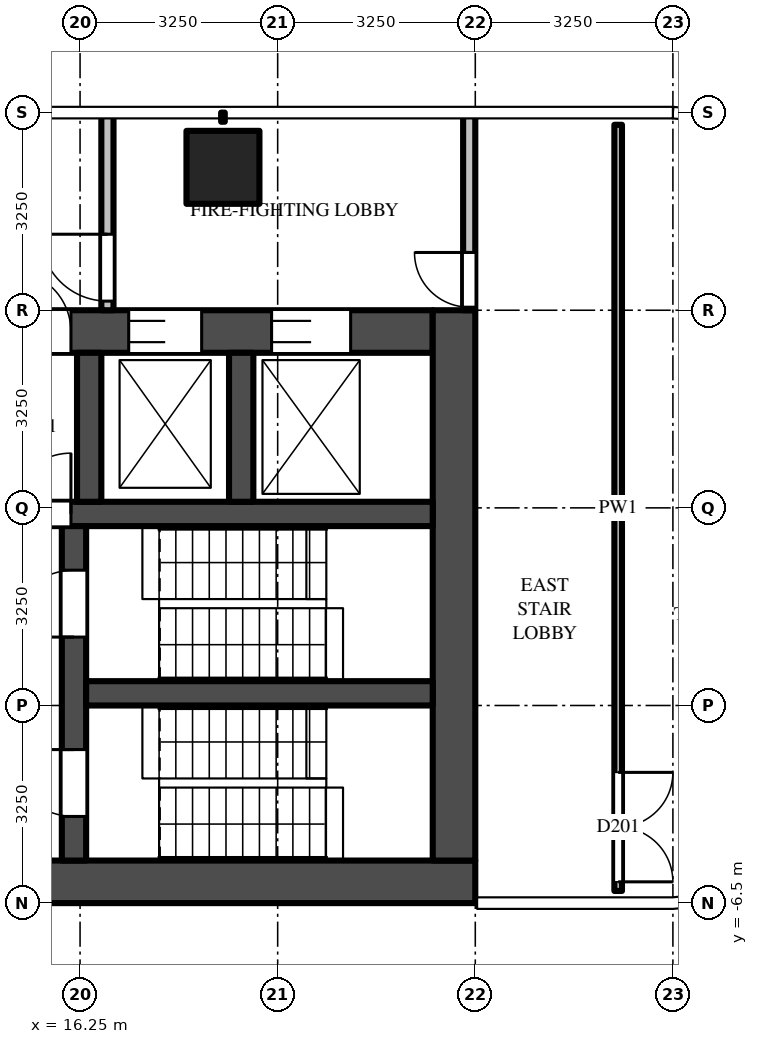
"""IFC4 building model, lengths in metres.
Left out: names, types, materials, properties, quantities, classifications, styles, units other than length and angle.
Written with IfcOpenShell. Run it as: python <this file> out.ifc"""

import sys

from ifc_helpers import new_model, si_unit, direction, frame, frame_2d, origin, origin_2d, place, context, subcontext, project, spatial, rectangle, extrude, source, transform, mapped, element, fill, save


model = new_model("IFC4")
c1 = context("Model", 3, precision=1e-05, world=origin(), true_north=direction((0.0, 1.0)))
c2 = subcontext(c1, "Body", "Model", "MODEL_VIEW")
j1 = project(units=[si_unit("LENGTHUNIT", "METRE"), si_unit("PLANEANGLEUNIT", "RADIAN")], contexts=[c1])
p1 = place(None, origin())
s1 = spatial("IfcSite", under=j1, at=p1, CompositionType="ELEMENT")
p2 = place(p1, origin())
s2 = spatial("IfcBuilding", under=s1, at=p2, CompositionType="ELEMENT")
p3 = place(p2, frame((0.0, 0.0, 204.9)))
s3 = spatial("IfcBuildingStorey", under=s2, at=p3, CompositionType="ELEMENT", Elevation=204.9)
m1 = source(origin(), c2, "Body", "SweptSolid", [
    extrude(rectangle(XDim=1.2, YDim=1.2, at=origin_2d()), origin(), (0.0, 0.0, 1.0), 3.9),
])
p4 = place(p3, frame((18.6, 5.6, 0.0), z_axis=(0.0, 0.0, 1.0), x_axis=(1.0, 0.0, 0.0)))
e1 = element("IfcColumn", 1, at=p4, inside=s3, PredefinedType="COLUMN", context=c2, shape_type="MappedRepresentation", body=[
    mapped(m1, transform((0.0, 0.0, 0.0))),
])
m2 = source(origin(), c2, "Body", "SweptSolid", [
    extrude(rectangle(XDim=16.55, YDim=0.7, at=frame_2d((8.275, 0.0))), origin(), (0.0, 0.0, 1.0), 3.7),
])
p5 = place(p3, frame((6.2, -6.15, 0.0), z_axis=(0.0, 0.0, 1.0), x_axis=(1.0, 0.0, 0.0)))
e2 = element("IfcWall", 2, at=p5, inside=s3, PredefinedType="SHEAR", context=c2, shape_type="MappedRepresentation", body=[
    mapped(m2, transform((0.0, 0.0, 0.0))),
])
m3 = source(origin(), c2, "Body", "SweptSolid", [
    extrude(rectangle(XDim=14.85, YDim=0.7, at=frame_2d((7.425, 0.0))), origin(), (0.0, 0.0, 1.0), 3.7),
])
p6 = place(p3, frame((7.2, 2.9, 0.0), z_axis=(0.0, 0.0, 1.0), x_axis=(1.0, 0.0, 0.0)))
e3 = element("IfcWall", 3, at=p6, inside=s3, PredefinedType="SHEAR", context=c2, shape_type="MappedRepresentation", body=[
    mapped(m3, transform((0.0, 0.0, 0.0))),
])
m4 = source(origin(), c2, "Body", "SweptSolid", [
    extrude(rectangle(XDim=1.1, YDim=2.1, at=frame_2d((0.55, 1.05))), frame((0.0, 0.36, 0.0), z_axis=(0.0, -1.0, 0.0), x_axis=(1.0, 0.0, 0.0)), (0.0, 0.0, 1.0), 0.72),
])
p7 = place(p6, frame((0.55, 0.0, 0.0)))
e4 = element("IfcOpeningElement", 4, at=p7, cuts=e3, PredefinedType="OPENING", context=c2, shape_type="MappedRepresentation", body=[
    mapped(m4, transform((0.0, 0.0, 0.0))),
])
p8 = place(p6, frame((3.15, 0.0, 0.0)))
e5 = element("IfcOpeningElement", 5, at=p8, cuts=e3, PredefinedType="OPENING", context=c2, shape_type="MappedRepresentation", body=[
    mapped(m4, transform((0.0, 0.0, 0.0))),
])
m5 = source(origin(), c2, "Body", "SweptSolid", [
    extrude(rectangle(XDim=1.2, YDim=2.1, at=frame_2d((0.6, 1.05))), frame((0.0, 0.36, 0.0), z_axis=(0.0, -1.0, 0.0), x_axis=(1.0, 0.0, 0.0)), (0.0, 0.0, 1.0), 0.72),
])
p9 = place(p6, frame((5.7, 0.0, 0.0)))
e6 = element("IfcOpeningElement", 6, at=p9, cuts=e3, PredefinedType="OPENING", context=c2, shape_type="MappedRepresentation", body=[
    mapped(m5, transform((0.0, 0.0, 0.0))),
])
m6 = source(origin(), c2, "Body", "SweptSolid", [
    extrude(rectangle(XDim=1.3, YDim=2.1, at=frame_2d((0.65, 1.05))), frame((0.0, 0.36, 0.0), z_axis=(0.0, -1.0, 0.0), x_axis=(1.0, 0.0, 0.0)), (0.0, 0.0, 1.0), 0.72),
])
p10 = place(p6, frame((12.2, 0.0, 0.0)))
e7 = element("IfcOpeningElement", 7, at=p10, cuts=e3, PredefinedType="OPENING", context=c2, shape_type="MappedRepresentation", body=[
    mapped(m6, transform((0.0, 0.0, 0.0))),
])
p11 = place(p6, frame((9.85, 0.0, 0.0)))
e8 = element("IfcOpeningElement", 8, at=p11, cuts=e3, PredefinedType="OPENING", context=c2, shape_type="MappedRepresentation", body=[
    mapped(m5, transform((0.0, 0.0, 0.0))),
])
m7 = source(origin(), c2, "Body", "SweptSolid", [
    extrude(rectangle(XDim=1.0, YDim=2.1, at=frame_2d((0.5, 1.05))), frame((0.0, 0.36, 0.0), z_axis=(0.0, -1.0, 0.0), x_axis=(1.0, 0.0, 0.0)), (0.0, 0.0, 1.0), 0.72),
])
p12 = place(p6, frame((7.9, 0.0, 0.0)))
e9 = element("IfcOpeningElement", 9, at=p12, cuts=e3, PredefinedType="OPENING", context=c2, shape_type="MappedRepresentation", body=[
    mapped(m7, transform((0.0, 0.0, 0.0))),
])
m8 = source(origin(), c2, "Body", "SweptSolid", [
    extrude(rectangle(XDim=9.05, YDim=0.7, at=frame_2d((4.525, 0.0))), origin(), (0.0, 0.0, 1.0), 3.7),
])
p13 = place(p3, frame((22.4, -5.8, 0.0), z_axis=(0.0, 0.0, 1.0), x_axis=(0.0, 1.0, 0.0)))
e10 = element("IfcWall", 10, at=p13, inside=s3, PredefinedType="SHEAR", context=c2, shape_type="MappedRepresentation", body=[
    mapped(m8, transform((0.0, 0.0, 0.0))),
])
m9 = source(origin(), c2, "Body", "SweptSolid", [
    extrude(rectangle(XDim=14.85, YDim=0.4, at=frame_2d((7.425, 0.0))), origin(), (0.0, 0.0, 1.0), 3.7),
])
p14 = place(p3, frame((7.2, -0.1, 0.0), z_axis=(0.0, 0.0, 1.0), x_axis=(1.0, 0.0, 0.0)))
e11 = element("IfcWall", 11, at=p14, inside=s3, PredefinedType="SHEAR", context=c2, shape_type="MappedRepresentation", body=[
    mapped(m9, transform((0.0, 0.0, 0.0))),
])
m10 = source(origin(), c2, "Body", "SweptSolid", [
    extrude(rectangle(XDim=1.0, YDim=2.1, at=frame_2d((0.5, 1.05))), frame((0.0, 0.21, 0.0), z_axis=(0.0, -1.0, 0.0), x_axis=(1.0, 0.0, 0.0)), (0.0, 0.0, 1.0), 0.42),
])
p15 = place(p14, frame((7.9, 0.0, 0.0)))
e12 = element("IfcOpeningElement", 12, at=p15, cuts=e11, PredefinedType="OPENING", context=c2, shape_type="MappedRepresentation", body=[
    mapped(m10, transform((0.0, 0.0, 0.0))),
])
m11 = source(origin(), c2, "Body", "SweptSolid", [
    extrude(rectangle(XDim=5.5, YDim=0.4, at=frame_2d((2.75, 0.0))), origin(), (0.0, 0.0, 1.0), 3.7),
])
p16 = place(p3, frame((16.15, -5.8, 0.0), z_axis=(0.0, 0.0, 1.0), x_axis=(0.0, 1.0, 0.0)))
e13 = element("IfcWall", 13, at=p16, inside=s3, PredefinedType="SHEAR", context=c2, shape_type="MappedRepresentation", body=[
    mapped(m11, transform((0.0, 0.0, 0.0))),
])
m12 = source(origin(), c2, "Body", "SweptSolid", [
    extrude(rectangle(XDim=1.1, YDim=2.1, at=frame_2d((0.55, 1.05))), frame((0.0, 0.21, 0.0), z_axis=(0.0, -1.0, 0.0), x_axis=(1.0, 0.0, 0.0)), (0.0, 0.0, 1.0), 0.42),
])
p17 = place(p16, frame((0.725, 0.0, 0.0)))
e14 = element("IfcOpeningElement", 14, at=p17, cuts=e13, PredefinedType="OPENING", context=c2, shape_type="MappedRepresentation", body=[
    mapped(m12, transform((0.0, 0.0, 0.0))),
])
p18 = place(p16, frame((3.675, 0.0, 0.0)))
e15 = element("IfcOpeningElement", 15, at=p18, cuts=e13, PredefinedType="OPENING", context=c2, shape_type="MappedRepresentation", body=[
    mapped(m12, transform((0.0, 0.0, 0.0))),
])
m13 = source(origin(), c2, "Body", "SweptSolid", [
    extrude(rectangle(XDim=5.7, YDim=0.4, at=frame_2d((2.85, 0.0))), origin(), (0.0, 0.0, 1.0), 3.7),
])
p19 = place(p3, frame((16.35, -3.05, 0.0), z_axis=(0.0, 0.0, 1.0), x_axis=(1.0, 0.0, 0.0)))
e16 = element("IfcWall", 16, at=p19, inside=s3, PredefinedType="SHEAR", context=c2, shape_type="MappedRepresentation", body=[
    mapped(m13, transform((0.0, 0.0, 0.0))),
])
m14 = source(origin(), c2, "Body", "SweptSolid", [
    extrude(rectangle(XDim=2.45, YDim=0.4, at=frame_2d((1.225, 0.0))), origin(), (0.0, 0.0, 1.0), 3.7),
])
for number, where, z_axis, x_axis in (
    (17, (16.4, 0.1, 0.0), (0.0, 0.0, 1.0), (0.0, 1.0, 0.0)),
    (18, (18.9, 0.1, 0.0), (0.0, 0.0, 1.0), (0.0, 1.0, 0.0)),
):
    element("IfcWall", number, at=place(p3, frame(where, z_axis=z_axis, x_axis=x_axis)), inside=s3, PredefinedType="SHEAR", context=c2, shape_type="MappedRepresentation", body=[
        mapped(m14, transform((0.0, 0.0, 0.0))),
    ])
m15 = source(origin(), c2, "Body", "SweptSolid", [
    extrude(rectangle(XDim=3.25, YDim=0.2, at=frame_2d((1.625, 0.0))), origin(), (0.0, 0.0, 1.0), 3.7),
])
p20 = place(p3, frame((16.7, 3.25, 0.0), z_axis=(0.0, 0.0, 1.0), x_axis=(0.0, 1.0, 0.0)))
e19 = element("IfcWall", 19, at=p20, inside=s3, PredefinedType="PARTITIONING", context=c2, shape_type="MappedRepresentation", body=[
    mapped(m15, transform((0.0, 0.0, 0.0))),
])
m16 = source(origin(), c2, "Body", "SweptSolid", [
    extrude(rectangle(XDim=1.1, YDim=2.1, at=frame_2d((0.55, 1.05))), frame((0.0, 0.11, 0.0), z_axis=(0.0, -1.0, 0.0), x_axis=(1.0, 0.0, 0.0)), (0.0, 0.0, 1.0), 0.22),
])
p21 = place(p20, frame((0.15, 0.0, 0.0)))
e20 = element("IfcOpeningElement", 20, at=p21, cuts=e19, PredefinedType="OPENING", context=c2, shape_type="MappedRepresentation", body=[
    mapped(m16, transform((0.0, 0.0, 0.0))),
])
p22 = place(p3, frame((22.65, 3.25, 0.0), z_axis=(0.0, 0.0, 1.0), x_axis=(0.0, 1.0, 0.0)))
e21 = element("IfcWall", 21, at=p22, inside=s3, PredefinedType="PARTITIONING", context=c2, shape_type="MappedRepresentation", body=[
    mapped(m15, transform((0.0, 0.0, 0.0))),
])
m17 = source(origin(), c2, "Body", "SweptSolid", [
    extrude(rectangle(XDim=0.9, YDim=2.1, at=frame_2d((0.45, 1.05))), frame((0.0, 0.11, 0.0), z_axis=(0.0, -1.0, 0.0), x_axis=(1.0, 0.0, 0.0)), (0.0, 0.0, 1.0), 0.22),
])
p23 = place(p22, frame((0.05, 0.0, 0.0)))
e22 = element("IfcOpeningElement", 22, at=p23, cuts=e21, PredefinedType="OPENING", context=c2, shape_type="MappedRepresentation", body=[
    mapped(m17, transform((0.0, 0.0, 0.0))),
])
m18 = source(origin(), c2, "Body", "SweptSolid", [
    extrude(rectangle(XDim=12.6, YDim=0.125, at=frame_2d((6.3, 0.0))), origin(), (0.0, 0.0, 1.0), 2.78),
])
p24 = place(p3, frame((25.1, 6.3, 0.0), z_axis=(0.0, 0.0, 1.0), x_axis=(0.0, -1.0, 0.0)))
e23 = element("IfcWall", 23, at=p24, inside=s3, PredefinedType="PARTITIONING", context=c2, shape_type="MappedRepresentation", body=[
    mapped(m18, transform((0.0, 0.0, 0.0))),
])
m19 = source(origin(), c2, "Body", "SweptSolid", [
    extrude(rectangle(XDim=1.8, YDim=2.1, at=frame_2d((0.9, 1.05))), frame((0.0, 0.073, 0.0), z_axis=(0.0, -1.0, 0.0), x_axis=(1.0, 0.0, 0.0)), (0.0, 0.0, 1.0), 0.145),
])
p25 = place(p24, frame((10.65, 0.0, 0.0)))
e24 = element("IfcOpeningElement", 24, at=p25, cuts=e23, PredefinedType="OPENING", context=c2, shape_type="MappedRepresentation", body=[
    mapped(m19, transform((0.0, 0.0, 0.0))),
])
m20 = source(origin(), c2, "Body", "SweptSolid", [
    extrude(rectangle(XDim=1.3, YDim=2.1, at=frame_2d((0.65, 1.05))), frame((0.0, -0.275, 0.0), z_axis=(0.0, -1.0, 0.0), x_axis=(1.0, 0.0, 0.0)), (0.0, 0.0, 1.0), 0.05),
])
p26 = place(p10, origin())
e25 = element("IfcDoor", 25, at=p26, inside=s3, OperationType="DOUBLE_DOOR_SLIDING", PredefinedType="DOOR", context=c2, shape_type="MappedRepresentation", body=[
    mapped(m20, transform((0.0, 0.0, 0.0))),
])
fill(e7, e25)
m21 = source(origin(), c2, "Body", "SweptSolid", [
    extrude(rectangle(XDim=1.2, YDim=2.1, at=frame_2d((0.6, 1.05))), frame((0.0, -0.275, 0.0), z_axis=(0.0, -1.0, 0.0), x_axis=(1.0, 0.0, 0.0)), (0.0, 0.0, 1.0), 0.05),
])
p27 = place(p11, origin())
e26 = element("IfcDoor", 26, at=p27, inside=s3, OperationType="DOUBLE_DOOR_SLIDING", PredefinedType="DOOR", context=c2, shape_type="MappedRepresentation", body=[
    mapped(m21, transform((0.0, 0.0, 0.0))),
])
fill(e8, e26)
m22 = source(origin(), c2, "Body", "SweptSolid", [
    extrude(rectangle(XDim=1.1, YDim=2.1, at=frame_2d((0.55, 1.05))), frame((0.0, 0.025, 0.0), z_axis=(0.0, -1.0, 0.0), x_axis=(1.0, 0.0, 0.0)), (0.0, 0.0, 1.0), 0.05),
])
p28 = place(p17, origin())
e27 = element("IfcDoor", 27, at=p28, inside=s3, OperationType="SINGLE_SWING_RIGHT", PredefinedType="DOOR", context=c2, shape_type="MappedRepresentation", body=[
    mapped(m22, transform((0.0, 0.0, 0.0))),
])
fill(e14, e27)
p29 = place(p18, origin())
e28 = element("IfcDoor", 28, at=p29, inside=s3, OperationType="SINGLE_SWING_LEFT", PredefinedType="DOOR", context=c2, shape_type="MappedRepresentation", body=[
    mapped(m22, transform((0.0, 0.0, 0.0))),
])
fill(e15, e28)
m23 = source(origin(), c2, "Body", "SweptSolid", [
    extrude(rectangle(XDim=1.0, YDim=2.1, at=frame_2d((0.5, 1.05))), frame((0.0, 0.025, 0.0), z_axis=(0.0, -1.0, 0.0), x_axis=(1.0, 0.0, 0.0)), (0.0, 0.0, 1.0), 0.05),
])
p30 = place(p15, origin())
e29 = element("IfcDoor", 29, at=p30, inside=s3, OperationType="SINGLE_SWING_RIGHT", PredefinedType="DOOR", context=c2, shape_type="MappedRepresentation", body=[
    mapped(m23, transform((0.0, 0.0, 0.0))),
])
fill(e12, e29)
m24 = source(origin(), c2, "Body", "SweptSolid", [
    extrude(rectangle(XDim=1.0, YDim=2.1, at=frame_2d((0.5, 1.05))), frame((0.0, -0.275, 0.0), z_axis=(0.0, -1.0, 0.0), x_axis=(1.0, 0.0, 0.0)), (0.0, 0.0, 1.0), 0.05),
])
p31 = place(p12, origin())
e30 = element("IfcDoor", 30, at=p31, inside=s3, OperationType="SINGLE_SWING_LEFT", PredefinedType="DOOR", context=c2, shape_type="MappedRepresentation", body=[
    mapped(m24, transform((0.0, 0.0, 0.0))),
])
fill(e9, e30)
p32 = place(p21, origin())
e31 = element("IfcDoor", 31, at=p32, inside=s3, OperationType="SINGLE_SWING_RIGHT", PredefinedType="DOOR", context=c2, shape_type="MappedRepresentation", body=[
    mapped(m22, transform((0.0, 0.0, 0.0))),
])
fill(e20, e31)
m25 = source(origin(), c2, "Body", "SweptSolid", [
    extrude(rectangle(XDim=0.9, YDim=2.1, at=frame_2d((0.45, 1.05))), frame((0.0, 0.025, 0.0), z_axis=(0.0, -1.0, 0.0), x_axis=(1.0, 0.0, 0.0)), (0.0, 0.0, 1.0), 0.05),
])
p33 = place(p23, origin())
e32 = element("IfcDoor", 32, at=p33, inside=s3, OperationType="SINGLE_SWING_RIGHT", PredefinedType="DOOR", context=c2, shape_type="MappedRepresentation", body=[
    mapped(m25, transform((0.0, 0.0, 0.0))),
])
fill(e22, e32)
m26 = source(origin(), c2, "Body", "SweptSolid", [
    extrude(rectangle(XDim=1.8, YDim=2.1, at=frame_2d((0.9, 1.05))), frame((0.0, 0.025, 0.0), z_axis=(0.0, -1.0, 0.0), x_axis=(1.0, 0.0, 0.0)), (0.0, 0.0, 1.0), 0.05),
])
p34 = place(p25, origin())
e33 = element("IfcDoor", 33, at=p34, inside=s3, OperationType="DOUBLE_DOOR_SINGLE_SWING", PredefinedType="DOOR", context=c2, shape_type="MappedRepresentation", body=[
    mapped(m26, transform((0.0, 0.0, 0.0))),
])
fill(e24, e33)
save(model, sys.argv[1])
